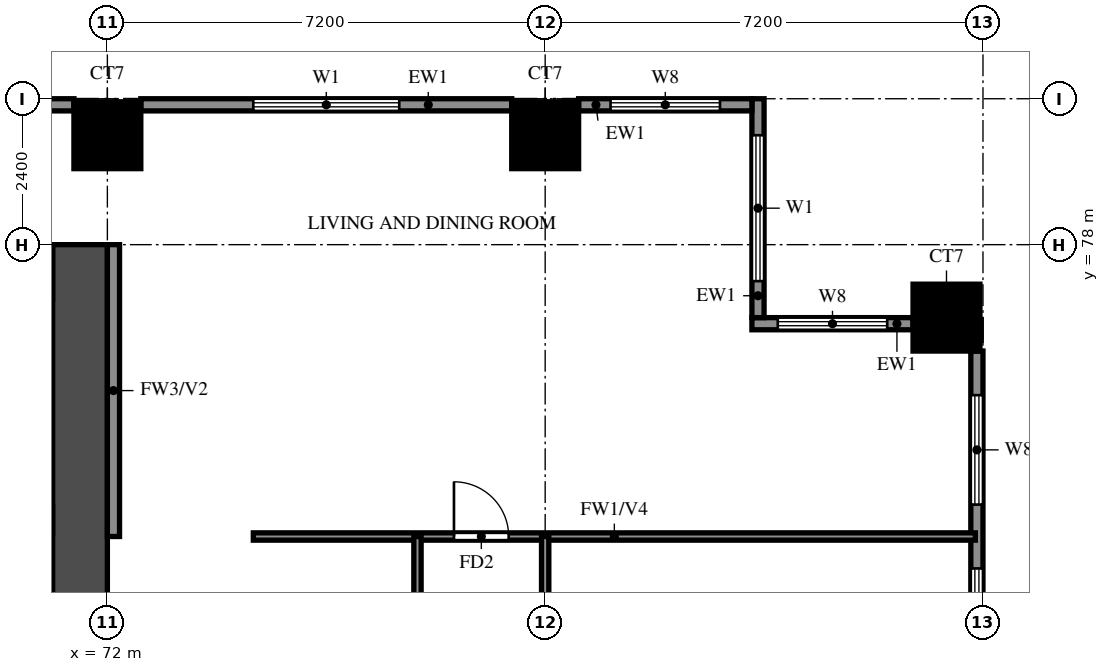
"""IFC4 building model, lengths in metres.
Left out: names, types, materials, properties, quantities, classifications, styles, units other than length and angle.
Written with IfcOpenShell. Run it as: python <this file> out.ifc"""

import sys

from ifc_helpers import new_model, si_unit, direction, frame, frame_2d, origin, origin_2d, place, context, subcontext, project, spatial, rectangle, extrude, source, transform, mapped, element, fill, save


model = new_model("IFC4")
c1 = context("Model", 3, precision=1e-05, world=origin(), true_north=direction((0.0, 1.0)))
c2 = subcontext(c1, "Body", "Model", "MODEL_VIEW")
j1 = project(units=[si_unit("LENGTHUNIT", "METRE"), si_unit("PLANEANGLEUNIT", "RADIAN")], contexts=[c1])
p1 = place(None, origin())
s1 = spatial("IfcSite", under=j1, at=p1, CompositionType="ELEMENT")
p2 = place(p1, origin())
s2 = spatial("IfcBuilding", under=s1, at=p2, CompositionType="ELEMENT")
p3 = place(p2, frame((0.0, 0.0, 34.0)))
s3 = spatial("IfcBuildingStorey", under=s2, at=p3, CompositionType="ELEMENT", Elevation=34.0)
m1 = source(origin(), c2, "Body", "SweptSolid", [
    extrude(rectangle(XDim=1.1, YDim=1.1, at=origin_2d()), origin(), (0.0, 0.0, 1.0), 3.18),
])
for number, where, z_axis, x_axis in (
    (1, (85.8, 76.8, 0.0), (0.0, 0.0, 1.0), (1.0, 0.0, 0.0)),
    (2, (72.0, 79.8, 0.0), (0.0, 0.0, 1.0), (1.0, 0.0, 0.0)),
    (3, (79.2, 79.8, 0.0), (0.0, 0.0, 1.0), (1.0, 0.0, 0.0)),
):
    element("IfcColumn", number, at=place(p3, frame(where, z_axis=z_axis, x_axis=x_axis)), inside=s3, PredefinedType="COLUMN", context=c2, shape_type="MappedRepresentation", body=[
        mapped(m1, transform((0.0, 0.0, 0.0))),
    ])
p4 = place(p3, frame((71.55, 66.0, 0.0), z_axis=(0.0, 0.0, 1.0), x_axis=(0.0, 1.0, 0.0)))
e4 = element("IfcWall", 4, at=p4, inside=s3, PredefinedType="SHEAR", context=c2, shape_type="SweptSolid", body=[
    extrude(rectangle(XDim=12.0, YDim=0.9, at=frame_2d((6.0, 0.0))), origin(), (0.0, 0.0, 1.0), 3.18),
])
p5 = place(p3, frame((29.7, 77.55, 0.0), z_axis=(0.0, 0.0, 1.0), x_axis=(1.0, 0.0, 0.0)))
e5 = element("IfcWall", 5, at=p5, inside=s3, PredefinedType="SHEAR", context=c2, shape_type="SweptSolid", body=[
    extrude(rectangle(XDim=41.4, YDim=0.9, at=frame_2d((20.7, 0.0))), origin(), (0.0, 0.0, 1.0), 3.18),
])
p6 = place(p3, frame((86.3, 70.15, 0.0), z_axis=(0.0, 0.0, 1.0), x_axis=(0.0, 1.0, 0.0)))
e6 = element("IfcWall", 6, at=p6, inside=s3, PredefinedType="SOLIDWALL", context=c2, shape_type="SweptSolid", body=[
    extrude(rectangle(XDim=6.1, YDim=0.2, at=frame_2d((3.05, 0.0))), origin(), (0.0, 0.0, 1.0), 3.18),
])
p7 = place(p6, frame((0.725, 0.0, 0.6)))
e7 = element("IfcOpeningElement", 7, at=p7, cuts=e6, PredefinedType="OPENING", context=c2, shape_type="SweptSolid", body=[
    extrude(rectangle(XDim=1.8, YDim=2.4, at=frame_2d((0.9, 1.2))), frame((0.0, 0.11, 0.0), z_axis=(0.0, -1.0, 0.0), x_axis=(1.0, 0.0, 0.0)), (0.0, 0.0, 1.0), 0.22),
])
p8 = place(p6, frame((3.575, 0.0, 0.6)))
e8 = element("IfcOpeningElement", 8, at=p8, cuts=e6, PredefinedType="OPENING", context=c2, shape_type="SweptSolid", body=[
    extrude(rectangle(XDim=1.8, YDim=2.4, at=frame_2d((0.9, 1.2))), frame((0.0, 0.11, 0.0), z_axis=(0.0, -1.0, 0.0), x_axis=(1.0, 0.0, 0.0)), (0.0, 0.0, 1.0), 0.22),
])
p9 = place(p3, frame((85.25, 76.7, 0.0), z_axis=(0.0, 0.0, 1.0), x_axis=(-1.0, 0.0, 0.0)))
e9 = element("IfcWall", 9, at=p9, inside=s3, PredefinedType="SOLIDWALL", context=c2, shape_type="SweptSolid", body=[
    extrude(rectangle(XDim=2.65, YDim=0.2, at=frame_2d((1.325, 0.0))), origin(), (0.0, 0.0, 1.0), 3.18),
])
p10 = place(p9, frame((0.425, 0.0, 0.6)))
e10 = element("IfcOpeningElement", 10, at=p10, cuts=e9, PredefinedType="OPENING", context=c2, shape_type="SweptSolid", body=[
    extrude(rectangle(XDim=1.8, YDim=2.4, at=frame_2d((0.9, 1.2))), frame((0.0, 0.11, 0.0), z_axis=(0.0, -1.0, 0.0), x_axis=(1.0, 0.0, 0.0)), (0.0, 0.0, 1.0), 0.22),
])
p11 = place(p3, frame((82.7, 76.8, 0.0), z_axis=(0.0, 0.0, 1.0), x_axis=(0.0, 1.0, 0.0)))
e11 = element("IfcWall", 11, at=p11, inside=s3, PredefinedType="SOLIDWALL", context=c2, shape_type="SweptSolid", body=[
    extrude(rectangle(XDim=3.6, YDim=0.2, at=frame_2d((1.8, 0.0))), origin(), (0.0, 0.0, 1.0), 3.18),
])
p12 = place(p11, frame((0.6, 0.0, 0.6)))
e12 = element("IfcOpeningElement", 12, at=p12, cuts=e11, PredefinedType="OPENING", context=c2, shape_type="SweptSolid", body=[
    extrude(rectangle(XDim=2.4, YDim=2.4, at=frame_2d((1.2, 1.2))), frame((0.0, 0.11, 0.0), z_axis=(0.0, -1.0, 0.0), x_axis=(1.0, 0.0, 0.0)), (0.0, 0.0, 1.0), 0.22),
])
p13 = place(p3, frame((82.6, 80.3, 0.0), z_axis=(0.0, 0.0, 1.0), x_axis=(-1.0, 0.0, 0.0)))
e13 = element("IfcWall", 13, at=p13, inside=s3, PredefinedType="SOLIDWALL", context=c2, shape_type="SweptSolid", body=[
    extrude(rectangle(XDim=2.85, YDim=0.2, at=frame_2d((1.425, 0.0))), origin(), (0.0, 0.0, 1.0), 3.18),
])
p14 = place(p13, frame((0.525, 0.0, 0.6)))
e14 = element("IfcOpeningElement", 14, at=p14, cuts=e13, PredefinedType="OPENING", context=c2, shape_type="SweptSolid", body=[
    extrude(rectangle(XDim=1.8, YDim=2.4, at=frame_2d((0.9, 1.2))), frame((0.0, 0.11, 0.0), z_axis=(0.0, -1.0, 0.0), x_axis=(1.0, 0.0, 0.0)), (0.0, 0.0, 1.0), 0.22),
])
p15 = place(p3, frame((78.65, 80.3, 0.0), z_axis=(0.0, 0.0, 1.0), x_axis=(-1.0, 0.0, 0.0)))
e15 = element("IfcWall", 15, at=p15, inside=s3, PredefinedType="SOLIDWALL", context=c2, shape_type="SweptSolid", body=[
    extrude(rectangle(XDim=6.1, YDim=0.2, at=frame_2d((3.05, 0.0))), origin(), (0.0, 0.0, 1.0), 3.18),
])
p16 = place(p15, frame((1.85, 0.0, 0.6)))
e16 = element("IfcOpeningElement", 16, at=p16, cuts=e15, PredefinedType="OPENING", context=c2, shape_type="SweptSolid", body=[
    extrude(rectangle(XDim=2.4, YDim=2.4, at=frame_2d((1.2, 1.2))), frame((0.0, 0.11, 0.0), z_axis=(0.0, -1.0, 0.0), x_axis=(1.0, 0.0, 0.0)), (0.0, 0.0, 1.0), 0.22),
])
p17 = place(p3, frame((71.45, 80.3, 0.0), z_axis=(0.0, 0.0, 1.0), x_axis=(-1.0, 0.0, 0.0)))
e17 = element("IfcWall", 17, at=p17, inside=s3, PredefinedType="SOLIDWALL", context=c2, shape_type="SweptSolid", body=[
    extrude(rectangle(XDim=6.1, YDim=0.2, at=frame_2d((3.05, 0.0))), origin(), (0.0, 0.0, 1.0), 3.18),
])
p18 = place(p3, frame((72.1, 73.2, 0.0), z_axis=(0.0, 0.0, 1.0), x_axis=(0.0, 1.0, 0.0)))
e18 = element("IfcWall", 18, at=p18, inside=s3, PredefinedType="SOLIDWALL", context=c2, shape_type="SweptSolid", body=[
    extrude(rectangle(XDim=4.8, YDim=0.2, at=frame_2d((2.4, 0.0))), origin(), (0.0, 0.0, 1.0), 3.18),
])
p19 = place(p3, frame((74.4, 73.2, 0.0), z_axis=(0.0, 0.0, 1.0), x_axis=(1.0, 0.0, 0.0)))
e19 = element("IfcWall", 19, at=p19, inside=s3, PredefinedType="PARTITIONING", context=c2, shape_type="SweptSolid", body=[
    extrude(rectangle(XDim=11.875, YDim=0.12, at=frame_2d((5.938, 0.0))), origin(), (0.0, 0.0, 1.0), 2.28),
])
p20 = place(p19, frame((3.3, 0.0, 0.0)))
e20 = element("IfcOpeningElement", 20, at=p20, cuts=e19, PredefinedType="OPENING", context=c2, shape_type="SweptSolid", body=[
    extrude(rectangle(XDim=0.9, YDim=2.1, at=frame_2d((0.45, 1.05))), frame((0.0, 0.07, 0.0), z_axis=(0.0, -1.0, 0.0), x_axis=(1.0, 0.0, 0.0)), (0.0, 0.0, 1.0), 0.14),
])
p21 = place(p3, frame((77.1, 61.2, 0.0), z_axis=(0.0, 0.0, 1.0), x_axis=(0.0, 1.0, 0.0)))
e21 = element("IfcWall", 21, at=p21, inside=s3, PredefinedType="PARTITIONING", context=c2, shape_type="SweptSolid", body=[
    extrude(rectangle(XDim=12.0, YDim=0.12, at=frame_2d((6.0, 0.0))), origin(), (0.0, 0.0, 1.0), 3.18),
])
p22 = place(p21, frame((1.875, 0.0, 0.0)))
e22 = element("IfcOpeningElement", 22, at=p22, cuts=e21, PredefinedType="OPENING", context=c2, shape_type="SweptSolid", body=[
    extrude(rectangle(XDim=0.9, YDim=2.1, at=frame_2d((0.45, 1.05))), frame((0.0, 0.07, 0.0), z_axis=(0.0, -1.0, 0.0), x_axis=(1.0, 0.0, 0.0)), (0.0, 0.0, 1.0), 0.14),
])
p23 = place(p21, frame((5.5, 0.0, 0.0)))
e23 = element("IfcOpeningElement", 23, at=p23, cuts=e21, PredefinedType="OPENING", context=c2, shape_type="SweptSolid", body=[
    extrude(rectangle(XDim=0.8, YDim=2.1, at=frame_2d((0.4, 1.05))), frame((0.0, 0.07, 0.0), z_axis=(0.0, -1.0, 0.0), x_axis=(1.0, 0.0, 0.0)), (0.0, 0.0, 1.0), 0.14),
])
p24 = place(p21, frame((9.125, 0.0, 0.0)))
e24 = element("IfcOpeningElement", 24, at=p24, cuts=e21, PredefinedType="OPENING", context=c2, shape_type="SweptSolid", body=[
    extrude(rectangle(XDim=0.9, YDim=2.1, at=frame_2d((0.45, 1.05))), frame((0.0, 0.07, 0.0), z_axis=(0.0, -1.0, 0.0), x_axis=(1.0, 0.0, 0.0)), (0.0, 0.0, 1.0), 0.14),
])
p25 = place(p3, frame((79.2, 55.2, 0.0), z_axis=(0.0, 0.0, 1.0), x_axis=(0.0, 1.0, 0.0)))
e25 = element("IfcWall", 25, at=p25, inside=s3, PredefinedType="PARTITIONING", context=c2, shape_type="SweptSolid", body=[
    extrude(rectangle(XDim=18.0, YDim=0.12, at=frame_2d((9.0, 0.0))), origin(), (0.0, 0.0, 1.0), 3.18),
])
p26 = place(p25, frame((1.05, 0.0, 0.0)))
e26 = element("IfcOpeningElement", 26, at=p26, cuts=e25, PredefinedType="OPENING", context=c2, shape_type="SweptSolid", body=[
    extrude(rectangle(XDim=1.5, YDim=2.1, at=frame_2d((0.75, 1.05))), frame((0.0, 0.07, 0.0), z_axis=(0.0, -1.0, 0.0), x_axis=(1.0, 0.0, 0.0)), (0.0, 0.0, 1.0), 0.14),
])
p27 = place(p25, frame((4.95, 0.0, 0.0)))
e27 = element("IfcOpeningElement", 27, at=p27, cuts=e25, PredefinedType="OPENING", context=c2, shape_type="SweptSolid", body=[
    extrude(rectangle(XDim=0.9, YDim=2.1, at=frame_2d((0.45, 1.05))), frame((0.0, 0.07, 0.0), z_axis=(0.0, -1.0, 0.0), x_axis=(1.0, 0.0, 0.0)), (0.0, 0.0, 1.0), 0.14),
])
p28 = place(p25, frame((8.55, 0.0, 0.0)))
e28 = element("IfcOpeningElement", 28, at=p28, cuts=e25, PredefinedType="OPENING", context=c2, shape_type="SweptSolid", body=[
    extrude(rectangle(XDim=0.9, YDim=2.1, at=frame_2d((0.45, 1.05))), frame((0.0, 0.07, 0.0), z_axis=(0.0, -1.0, 0.0), x_axis=(1.0, 0.0, 0.0)), (0.0, 0.0, 1.0), 0.14),
])
p29 = place(p25, frame((12.15, 0.0, 0.0)))
e29 = element("IfcOpeningElement", 29, at=p29, cuts=e25, PredefinedType="OPENING", context=c2, shape_type="SweptSolid", body=[
    extrude(rectangle(XDim=0.9, YDim=2.1, at=frame_2d((0.45, 1.05))), frame((0.0, 0.07, 0.0), z_axis=(0.0, -1.0, 0.0), x_axis=(1.0, 0.0, 0.0)), (0.0, 0.0, 1.0), 0.14),
])
p30 = place(p25, frame((15.75, 0.0, 0.0)))
e30 = element("IfcOpeningElement", 30, at=p30, cuts=e25, PredefinedType="OPENING", context=c2, shape_type="SweptSolid", body=[
    extrude(rectangle(XDim=0.9, YDim=2.1, at=frame_2d((0.45, 1.05))), frame((0.0, 0.07, 0.0), z_axis=(0.0, -1.0, 0.0), x_axis=(1.0, 0.0, 0.0)), (0.0, 0.0, 1.0), 0.14),
])
p31 = place(p7, origin())
e31 = element("IfcWindow", 31, at=p31, inside=s3, PartitioningType="DOUBLE_PANEL_VERTICAL", PredefinedType="WINDOW", context=c2, shape_type="SweptSolid", body=[
    extrude(rectangle(XDim=1.8, YDim=2.4, at=frame_2d((0.9, 1.2))), frame((0.0, 0.03, 0.0), z_axis=(0.0, -1.0, 0.0), x_axis=(1.0, 0.0, 0.0)), (0.0, 0.0, 1.0), 0.06),
])
fill(e7, e31)
p32 = place(p8, origin())
e32 = element("IfcWindow", 32, at=p32, inside=s3, PartitioningType="DOUBLE_PANEL_VERTICAL", PredefinedType="WINDOW", context=c2, shape_type="SweptSolid", body=[
    extrude(rectangle(XDim=1.8, YDim=2.4, at=frame_2d((0.9, 1.2))), frame((0.0, 0.03, 0.0), z_axis=(0.0, -1.0, 0.0), x_axis=(1.0, 0.0, 0.0)), (0.0, 0.0, 1.0), 0.06),
])
fill(e8, e32)
p33 = place(p10, origin())
e33 = element("IfcWindow", 33, at=p33, inside=s3, PartitioningType="DOUBLE_PANEL_VERTICAL", PredefinedType="WINDOW", context=c2, shape_type="SweptSolid", body=[
    extrude(rectangle(XDim=1.8, YDim=2.4, at=frame_2d((0.9, 1.2))), frame((0.0, 0.03, 0.0), z_axis=(0.0, -1.0, 0.0), x_axis=(1.0, 0.0, 0.0)), (0.0, 0.0, 1.0), 0.06),
])
fill(e10, e33)
p34 = place(p12, origin())
e34 = element("IfcWindow", 34, at=p34, inside=s3, PartitioningType="DOUBLE_PANEL_VERTICAL", PredefinedType="WINDOW", context=c2, shape_type="SweptSolid", body=[
    extrude(rectangle(XDim=2.4, YDim=2.4, at=frame_2d((1.2, 1.2))), frame((0.0, 0.03, 0.0), z_axis=(0.0, -1.0, 0.0), x_axis=(1.0, 0.0, 0.0)), (0.0, 0.0, 1.0), 0.06),
])
fill(e12, e34)
p35 = place(p14, origin())
e35 = element("IfcWindow", 35, at=p35, inside=s3, PartitioningType="DOUBLE_PANEL_VERTICAL", PredefinedType="WINDOW", context=c2, shape_type="SweptSolid", body=[
    extrude(rectangle(XDim=1.8, YDim=2.4, at=frame_2d((0.9, 1.2))), frame((0.0, 0.03, 0.0), z_axis=(0.0, -1.0, 0.0), x_axis=(1.0, 0.0, 0.0)), (0.0, 0.0, 1.0), 0.06),
])
fill(e14, e35)
p36 = place(p16, origin())
e36 = element("IfcWindow", 36, at=p36, inside=s3, PartitioningType="DOUBLE_PANEL_VERTICAL", PredefinedType="WINDOW", context=c2, shape_type="SweptSolid", body=[
    extrude(rectangle(XDim=2.4, YDim=2.4, at=frame_2d((1.2, 1.2))), frame((0.0, 0.03, 0.0), z_axis=(0.0, -1.0, 0.0), x_axis=(1.0, 0.0, 0.0)), (0.0, 0.0, 1.0), 0.06),
])
fill(e16, e36)
p37 = place(p20, origin())
e37 = element("IfcDoor", 37, at=p37, inside=s3, OperationType="SINGLE_SWING_LEFT", PredefinedType="DOOR", context=c2, shape_type="SweptSolid", body=[
    extrude(rectangle(XDim=0.9, YDim=2.1, at=frame_2d((0.45, 1.05))), frame((0.0, 0.025, 0.0), z_axis=(0.0, -1.0, 0.0), x_axis=(1.0, 0.0, 0.0)), (0.0, 0.0, 1.0), 0.05),
])
fill(e20, e37)
save(model, sys.argv[1])
